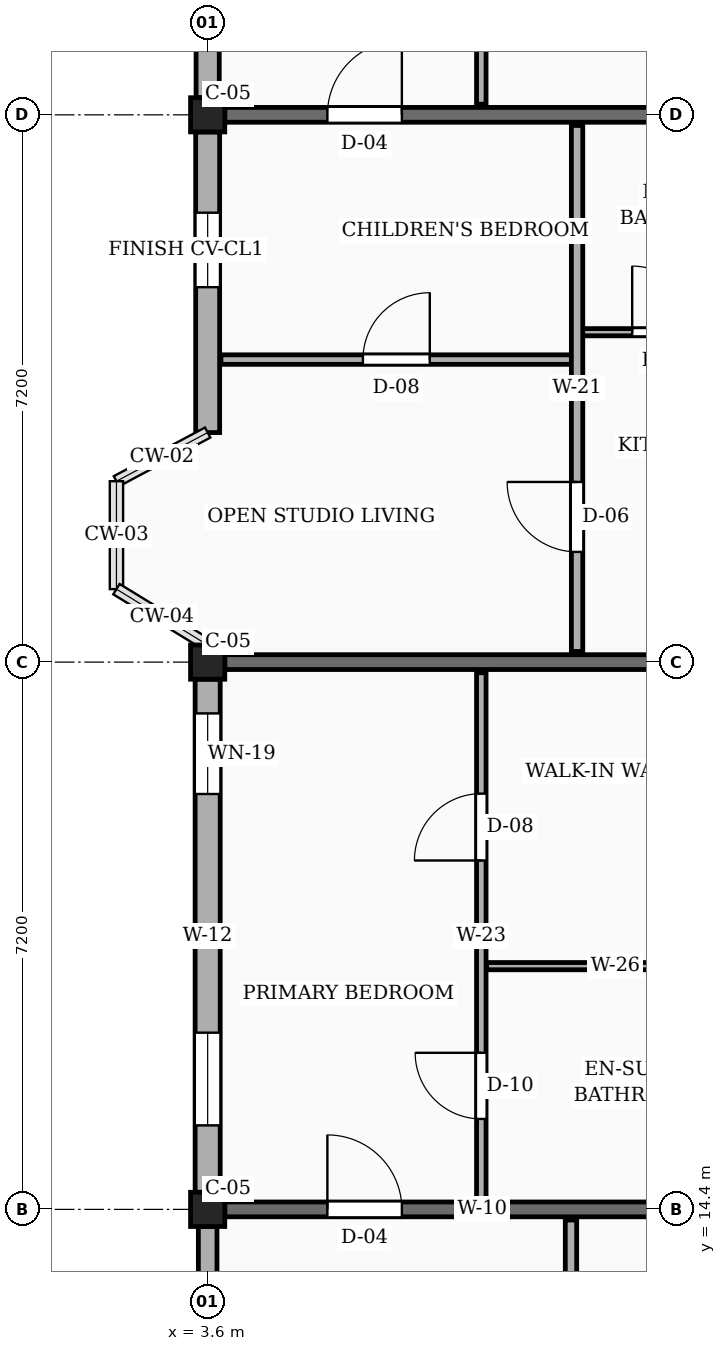
"""IFC4 building model, lengths in metres.
Left out: names, types, materials, properties, quantities, classifications, styles, units other than length and angle.
Written with IfcOpenShell. Run it as: python <this file> out.ifc"""

import sys

from ifc_helpers import new_model, si_unit, direction, frame, frame_2d, origin, origin_2d, place, context, subcontext, project, spatial, rectangle, extrude, element, fill, save


model = new_model("IFC4")
c1 = context("Model", 3, precision=1e-05, world=origin(), true_north=direction((0.0, 1.0)))
c2 = subcontext(c1, "Body", "Model", "MODEL_VIEW")
j1 = project(units=[si_unit("LENGTHUNIT", "METRE"), si_unit("PLANEANGLEUNIT", "RADIAN")], contexts=[c1])
p1 = place(None, origin())
s1 = spatial("IfcSite", under=j1, at=p1, CompositionType="ELEMENT")
p2 = place(p1, origin())
s2 = spatial("IfcBuilding", under=s1, at=p2, CompositionType="ELEMENT")
p3 = place(p2, frame((0.0, 0.0, 42.3)))
s3 = spatial("IfcBuildingStorey", under=s2, at=p3, CompositionType="ELEMENT", Elevation=42.3)
for number, where, z_axis, x_axis in (
    (1, (3.6, 14.4, 0.0), (0.0, 0.0, 1.0), (1.0, 0.0, 0.0)),
    (2, (3.6, 21.6, 0.0), (0.0, 0.0, 1.0), (1.0, 0.0, 0.0)),
    (3, (3.6, 28.8, 0.0), (0.0, 0.0, 1.0), (1.0, 0.0, 0.0)),
):
    element("IfcColumn", number, at=place(p3, frame(where, z_axis=z_axis, x_axis=x_axis)), inside=s3, PredefinedType="COLUMN", context=c2, shape_type="SweptSolid", body=[
        extrude(rectangle(XDim=0.45, YDim=0.45, at=origin_2d()), origin(), (0.0, 0.0, 1.0), 3.15),
    ])
p4 = place(p3, frame((3.825, 14.4, 0.0), z_axis=(0.0, 0.0, 1.0), x_axis=(1.0, 0.0, 0.0)))
e4 = element("IfcWall", 4, at=p4, inside=s3, PredefinedType="SOLIDWALL", context=c2, shape_type="SweptSolid", body=[
    extrude(rectangle(XDim=6.775, YDim=0.195, at=frame_2d((3.388, 0.0))), origin(), (0.0, 0.0, 1.0), 2.17),
])
p5 = place(p4, frame((1.35, 0.0, 0.0)))
e5 = element("IfcOpeningElement", 5, at=p5, cuts=e4, PredefinedType="OPENING", context=c2, shape_type="SweptSolid", body=[
    extrude(rectangle(XDim=0.98, YDim=2.12, at=frame_2d((0.49, 1.06))), frame((0.0, 0.107, 0.0), z_axis=(0.0, -1.0, 0.0), x_axis=(1.0, 0.0, 0.0)), (0.0, 0.0, 1.0), 0.215),
])
p6 = place(p3, frame((3.825, 21.6, 0.0), z_axis=(0.0, 0.0, 1.0), x_axis=(1.0, 0.0, 0.0)))
e6 = element("IfcWall", 6, at=p6, inside=s3, PredefinedType="SOLIDWALL", context=c2, shape_type="SweptSolid", body=[
    extrude(rectangle(XDim=6.775, YDim=0.195, at=frame_2d((3.388, 0.0))), origin(), (0.0, 0.0, 1.0), 2.17),
])
p7 = place(p3, frame((3.825, 28.8, 0.0), z_axis=(0.0, 0.0, 1.0), x_axis=(1.0, 0.0, 0.0)))
e7 = element("IfcWall", 7, at=p7, inside=s3, PredefinedType="SOLIDWALL", context=c2, shape_type="SweptSolid", body=[
    extrude(rectangle(XDim=6.775, YDim=0.195, at=frame_2d((3.388, 0.0))), origin(), (0.0, 0.0, 1.0), 2.17),
])
p8 = place(p7, frame((1.35, 0.0, 0.0)))
e8 = element("IfcOpeningElement", 8, at=p8, cuts=e7, PredefinedType="OPENING", context=c2, shape_type="SweptSolid", body=[
    extrude(rectangle(XDim=0.98, YDim=2.12, at=frame_2d((0.49, 1.06))), frame((0.0, 0.107, 0.0), z_axis=(0.0, -1.0, 0.0), x_axis=(1.0, 0.0, 0.0)), (0.0, 0.0, 1.0), 0.215),
])
p9 = place(p3, frame((3.6, 35.775, 0.0), z_axis=(0.0, 0.0, 1.0), x_axis=(0.0, -1.0, 0.0)))
e9 = element("IfcWall", 9, at=p9, inside=s3, PredefinedType="SOLIDWALL", context=c2, shape_type="SweptSolid", body=[
    extrude(rectangle(XDim=6.75, YDim=0.305, at=frame_2d((3.375, 0.0))), origin(), (0.0, 0.0, 1.0), 2.44),
])
p10 = place(p9, frame((0.45, 0.0, 0.78)))
e10 = element("IfcOpeningElement", 10, at=p10, cuts=e9, PredefinedType="OPENING", context=c2, shape_type="SweptSolid", body=[
    extrude(rectangle(XDim=1.44, YDim=1.26, at=frame_2d((0.72, 0.63))), frame((0.0, 0.163, 0.0), z_axis=(0.0, -1.0, 0.0), x_axis=(1.0, 0.0, 0.0)), (0.0, 0.0, 1.0), 0.325),
])
p11 = place(p9, frame((4.65, 0.0, 0.78)))
e11 = element("IfcOpeningElement", 11, at=p11, cuts=e9, PredefinedType="OPENING", context=c2, shape_type="SweptSolid", body=[
    extrude(rectangle(XDim=0.98, YDim=1.36, at=frame_2d((0.49, 0.68))), frame((0.0, 0.163, 0.0), z_axis=(0.0, -1.0, 0.0), x_axis=(1.0, 0.0, 0.0)), (0.0, 0.0, 1.0), 0.325),
])
p12 = place(p3, frame((3.6, 28.575, 0.0), z_axis=(0.0, 0.0, 1.0), x_axis=(0.0, -1.0, 0.0)))
e12 = element("IfcWall", 12, at=p12, inside=s3, PredefinedType="SOLIDWALL", context=c2, shape_type="SweptSolid", body=[
    extrude(rectangle(XDim=3.955, YDim=0.315, at=frame_2d((1.978, 0.0))), origin(), (0.0, 0.0, 1.0), 2.44),
])
p13 = place(p12, frame((1.062, 0.0, 0.78)))
e13 = element("IfcOpeningElement", 13, at=p13, cuts=e12, PredefinedType="OPENING", context=c2, shape_type="SweptSolid", body=[
    extrude(rectangle(XDim=0.98, YDim=1.36, at=frame_2d((0.49, 0.68))), frame((0.0, 0.167, 0.0), z_axis=(0.0, -1.0, 0.0), x_axis=(1.0, 0.0, 0.0)), (0.0, 0.0, 1.0), 0.335),
])
p14 = place(p3, frame((3.6, 21.375, 0.0), z_axis=(0.0, 0.0, 1.0), x_axis=(0.0, -1.0, 0.0)))
e14 = element("IfcWall", 14, at=p14, inside=s3, PredefinedType="SOLIDWALL", context=c2, shape_type="SweptSolid", body=[
    extrude(rectangle(XDim=6.75, YDim=0.33, at=frame_2d((3.375, 0.0))), origin(), (0.0, 0.0, 1.0), 2.44),
])
p15 = place(p14, frame((0.45, 0.0, 0.78)))
e15 = element("IfcOpeningElement", 15, at=p15, cuts=e14, PredefinedType="OPENING", context=c2, shape_type="SweptSolid", body=[
    extrude(rectangle(XDim=1.06, YDim=1.36, at=frame_2d((0.53, 0.68))), frame((0.0, 0.175, 0.0), z_axis=(0.0, -1.0, 0.0), x_axis=(1.0, 0.0, 0.0)), (0.0, 0.0, 1.0), 0.35),
])
p16 = place(p14, frame((4.65, 0.0, 0.78)))
e16 = element("IfcOpeningElement", 16, at=p16, cuts=e14, PredefinedType="OPENING", context=c2, shape_type="SweptSolid", body=[
    extrude(rectangle(XDim=1.22, YDim=1.36, at=frame_2d((0.61, 0.68))), frame((0.0, 0.175, 0.0), z_axis=(0.0, -1.0, 0.0), x_axis=(1.0, 0.0, 0.0)), (0.0, 0.0, 1.0), 0.35),
])
p17 = place(p3, frame((3.6, 14.175, 0.0), z_axis=(0.0, 0.0, 1.0), x_axis=(0.0, -1.0, 0.0)))
e17 = element("IfcWall", 17, at=p17, inside=s3, PredefinedType="SOLIDWALL", context=c2, shape_type="SweptSolid", body=[
    extrude(rectangle(XDim=3.955, YDim=0.245, at=frame_2d((1.978, 0.0))), origin(), (0.0, 0.0, 1.0), 2.44),
])
p18 = place(p17, frame((0.893, 0.0, 0.78)))
e18 = element("IfcOpeningElement", 18, at=p18, cuts=e17, PredefinedType="OPENING", context=c2, shape_type="SweptSolid", body=[
    extrude(rectangle(XDim=1.22, YDim=1.36, at=frame_2d((0.61, 0.68))), frame((0.0, 0.133, 0.0), z_axis=(0.0, -1.0, 0.0), x_axis=(1.0, 0.0, 0.0)), (0.0, 0.0, 1.0), 0.265),
])
p19 = place(p3, frame((8.38, 7.375, 0.0), z_axis=(0.0, 0.0, 1.0), x_axis=(0.0, 1.0, 0.0)))
e19 = element("IfcWall", 19, at=p19, inside=s3, PredefinedType="PARTITIONING", context=c2, shape_type="SweptSolid", body=[
    extrude(rectangle(XDim=6.885, YDim=0.15, at=frame_2d((3.442, 0.0))), origin(), (0.0, 0.0, 1.0), 2.305),
])
p20 = place(p19, frame((1.275, 0.0, 0.0)))
e20 = element("IfcOpeningElement", 20, at=p20, cuts=e19, PredefinedType="OPENING", context=c2, shape_type="SweptSolid", body=[
    extrude(rectangle(XDim=0.92, YDim=2.1, at=frame_2d((0.46, 1.05))), frame((0.0, 0.085, 0.0), z_axis=(0.0, -1.0, 0.0), x_axis=(1.0, 0.0, 0.0)), (0.0, 0.0, 1.0), 0.17),
])
p21 = place(p3, frame((7.2, 14.54, 0.0), z_axis=(0.0, 0.0, 1.0), x_axis=(0.0, 1.0, 0.0)))
e21 = element("IfcWall", 21, at=p21, inside=s3, PredefinedType="PARTITIONING", context=c2, shape_type="SweptSolid", body=[
    extrude(rectangle(XDim=6.92, YDim=0.125, at=frame_2d((3.46, 0.0))), origin(), (0.0, 0.0, 1.0), 2.305),
])
p22 = place(p21, frame((1.05, 0.0, 0.0)))
e22 = element("IfcOpeningElement", 22, at=p22, cuts=e21, PredefinedType="OPENING", context=c2, shape_type="SweptSolid", body=[
    extrude(rectangle(XDim=0.87, YDim=2.05, at=frame_2d((0.435, 1.025))), frame((0.0, 0.073, 0.0), z_axis=(0.0, -1.0, 0.0), x_axis=(1.0, 0.0, 0.0)), (0.0, 0.0, 1.0), 0.145),
])
p23 = place(p21, frame((4.45, 0.0, 0.0)))
e23 = element("IfcOpeningElement", 23, at=p23, cuts=e21, PredefinedType="OPENING", context=c2, shape_type="SweptSolid", body=[
    extrude(rectangle(XDim=0.88, YDim=2.08, at=frame_2d((0.44, 1.04))), frame((0.0, 0.073, 0.0), z_axis=(0.0, -1.0, 0.0), x_axis=(1.0, 0.0, 0.0)), (0.0, 0.0, 1.0), 0.145),
])
p24 = place(p3, frame((7.27, 17.6, 0.0), z_axis=(0.0, 0.0, 1.0), x_axis=(1.0, 0.0, 0.0)))
e24 = element("IfcWall", 24, at=p24, inside=s3, PredefinedType="PARTITIONING", context=c2, shape_type="SweptSolid", body=[
    extrude(rectangle(XDim=3.39, YDim=0.095, at=frame_2d((1.695, 0.0))), origin(), (0.0, 0.0, 1.0), 2.305),
])
p25 = place(p3, frame((3.775, 25.58, 0.0), z_axis=(0.0, 0.0, 1.0), x_axis=(1.0, 0.0, 0.0)))
e25 = element("IfcWall", 25, at=p25, inside=s3, PredefinedType="PARTITIONING", context=c2, shape_type="SweptSolid", body=[
    extrude(rectangle(XDim=4.615, YDim=0.125, at=frame_2d((2.308, 0.0))), origin(), (0.0, 0.0, 1.0), 2.305),
])
p26 = place(p25, frame((1.867, 0.0, 0.0)))
e26 = element("IfcOpeningElement", 26, at=p26, cuts=e25, PredefinedType="OPENING", context=c2, shape_type="SweptSolid", body=[
    extrude(rectangle(XDim=0.88, YDim=2.08, at=frame_2d((0.44, 1.04))), frame((0.0, 0.073, 0.0), z_axis=(0.0, -1.0, 0.0), x_axis=(1.0, 0.0, 0.0)), (0.0, 0.0, 1.0), 0.145),
])
p27 = place(p3, frame((8.53, 25.94, 0.0), z_axis=(0.0, 0.0, 1.0), x_axis=(1.0, 0.0, 0.0)))
e27 = element("IfcWall", 27, at=p27, inside=s3, PredefinedType="PARTITIONING", context=c2, shape_type="SweptSolid", body=[
    extrude(rectangle(XDim=2.18, YDim=0.095, at=frame_2d((1.09, 0.0))), origin(), (0.0, 0.0, 1.0), 2.305),
])
p28 = place(p27, frame((0.655, 0.0, 0.0)))
e28 = element("IfcOpeningElement", 28, at=p28, cuts=e27, PredefinedType="OPENING", context=c2, shape_type="SweptSolid", body=[
    extrude(rectangle(XDim=0.87, YDim=2.05, at=frame_2d((0.435, 1.025))), frame((0.0, 0.058, 0.0), z_axis=(0.0, -1.0, 0.0), x_axis=(1.0, 0.0, 0.0)), (0.0, 0.0, 1.0), 0.115),
])
p29 = place(p3, frame((8.46, 21.74, 0.0), z_axis=(0.0, 0.0, 1.0), x_axis=(0.0, 1.0, 0.0)))
e29 = element("IfcWall", 29, at=p29, inside=s3, PredefinedType="PARTITIONING", context=c2, shape_type="SweptSolid", body=[
    extrude(rectangle(XDim=6.92, YDim=0.15, at=frame_2d((3.46, 0.0))), origin(), (0.0, 0.0, 1.0), 2.305),
])
p30 = place(p29, frame((1.31, 0.0, 0.0)))
e30 = element("IfcOpeningElement", 30, at=p30, cuts=e29, PredefinedType="OPENING", context=c2, shape_type="SweptSolid", body=[
    extrude(rectangle(XDim=0.92, YDim=2.1, at=frame_2d((0.46, 1.05))), frame((0.0, 0.085, 0.0), z_axis=(0.0, -1.0, 0.0), x_axis=(1.0, 0.0, 0.0)), (0.0, 0.0, 1.0), 0.17),
])
p31 = place(p3, frame((7.2, 28.94, 0.0), z_axis=(0.0, 0.0, 1.0), x_axis=(0.0, 1.0, 0.0)))
e31 = element("IfcWall", 31, at=p31, inside=s3, PredefinedType="PARTITIONING", context=c2, shape_type="SweptSolid", body=[
    extrude(rectangle(XDim=6.92, YDim=0.125, at=frame_2d((3.46, 0.0))), origin(), (0.0, 0.0, 1.0), 2.305),
])
p32 = place(p31, frame((1.05, 0.0, 0.0)))
e32 = element("IfcOpeningElement", 32, at=p32, cuts=e31, PredefinedType="OPENING", context=c2, shape_type="SweptSolid", body=[
    extrude(rectangle(XDim=0.87, YDim=2.05, at=frame_2d((0.435, 1.025))), frame((0.0, 0.073, 0.0), z_axis=(0.0, -1.0, 0.0), x_axis=(1.0, 0.0, 0.0)), (0.0, 0.0, 1.0), 0.145),
])
p33 = place(p31, frame((4.45, 0.0, 0.0)))
e33 = element("IfcOpeningElement", 33, at=p33, cuts=e31, PredefinedType="OPENING", context=c2, shape_type="SweptSolid", body=[
    extrude(rectangle(XDim=0.88, YDim=2.08, at=frame_2d((0.44, 1.04))), frame((0.0, 0.073, 0.0), z_axis=(0.0, -1.0, 0.0), x_axis=(1.0, 0.0, 0.0)), (0.0, 0.0, 1.0), 0.145),
])
p34 = place(p13, origin())
e34 = element("IfcWindow", 34, at=p34, inside=s3, PartitioningType="SINGLE_PANEL", PredefinedType="WINDOW", context=c2, shape_type="SweptSolid", body=[
    extrude(rectangle(XDim=0.98, YDim=1.36, at=frame_2d((0.49, 0.68))), frame((0.0, 0.03, 0.0), z_axis=(0.0, -1.0, 0.0), x_axis=(1.0, 0.0, 0.0)), (0.0, 0.0, 1.0), 0.06),
])
fill(e13, e34)
p35 = place(p15, origin())
e35 = element("IfcWindow", 35, at=p35, inside=s3, PartitioningType="SINGLE_PANEL", PredefinedType="WINDOW", context=c2, shape_type="SweptSolid", body=[
    extrude(rectangle(XDim=1.06, YDim=1.36, at=frame_2d((0.53, 0.68))), frame((0.0, 0.03, 0.0), z_axis=(0.0, -1.0, 0.0), x_axis=(1.0, 0.0, 0.0)), (0.0, 0.0, 1.0), 0.06),
])
fill(e15, e35)
p36 = place(p16, origin())
e36 = element("IfcWindow", 36, at=p36, inside=s3, PartitioningType="SINGLE_PANEL", PredefinedType="WINDOW", context=c2, shape_type="SweptSolid", body=[
    extrude(rectangle(XDim=1.22, YDim=1.36, at=frame_2d((0.61, 0.68))), frame((0.0, 0.03, 0.0), z_axis=(0.0, -1.0, 0.0), x_axis=(1.0, 0.0, 0.0)), (0.0, 0.0, 1.0), 0.06),
])
fill(e16, e36)
p37 = place(p22, origin())
e37 = element("IfcDoor", 37, at=p37, inside=s3, OperationType="SINGLE_SWING_RIGHT", PredefinedType="DOOR", context=c2, shape_type="SweptSolid", body=[
    extrude(rectangle(XDim=0.87, YDim=2.05, at=frame_2d((0.435, 1.025))), frame((0.0, 0.025, 0.0), z_axis=(0.0, -1.0, 0.0), x_axis=(1.0, 0.0, 0.0)), (0.0, 0.0, 1.0), 0.05),
])
fill(e22, e37)
p38 = place(p23, origin())
e38 = element("IfcDoor", 38, at=p38, inside=s3, OperationType="SINGLE_SWING_LEFT", PredefinedType="DOOR", context=c2, shape_type="SweptSolid", body=[
    extrude(rectangle(XDim=0.88, YDim=2.08, at=frame_2d((0.44, 1.04))), frame((0.0, 0.025, 0.0), z_axis=(0.0, -1.0, 0.0), x_axis=(1.0, 0.0, 0.0)), (0.0, 0.0, 1.0), 0.05),
])
fill(e23, e38)
p39 = place(p26, origin())
e39 = element("IfcDoor", 39, at=p39, inside=s3, OperationType="SINGLE_SWING_RIGHT", PredefinedType="DOOR", context=c2, shape_type="SweptSolid", body=[
    extrude(rectangle(XDim=0.88, YDim=2.08, at=frame_2d((0.44, 1.04))), frame((0.0, 0.025, 0.0), z_axis=(0.0, -1.0, 0.0), x_axis=(1.0, 0.0, 0.0)), (0.0, 0.0, 1.0), 0.05),
])
fill(e26, e39)
p40 = place(p28, origin())
e40 = element("IfcDoor", 40, at=p40, inside=s3, OperationType="SINGLE_SWING_LEFT", PredefinedType="DOOR", context=c2, shape_type="SweptSolid", body=[
    extrude(rectangle(XDim=0.87, YDim=2.05, at=frame_2d((0.435, 1.025))), frame((0.0, 0.025, 0.0), z_axis=(0.0, -1.0, 0.0), x_axis=(1.0, 0.0, 0.0)), (0.0, 0.0, 1.0), 0.05),
])
fill(e28, e40)
p41 = place(p30, origin())
e41 = element("IfcDoor", 41, at=p41, inside=s3, OperationType="SINGLE_SWING_RIGHT", PredefinedType="DOOR", context=c2, shape_type="SweptSolid", body=[
    extrude(rectangle(XDim=0.92, YDim=2.1, at=frame_2d((0.46, 1.05))), frame((0.0, 0.025, 0.0), z_axis=(0.0, -1.0, 0.0), x_axis=(1.0, 0.0, 0.0)), (0.0, 0.0, 1.0), 0.05),
])
fill(e30, e41)
p42 = place(p5, origin())
e42 = element("IfcDoor", 42, at=p42, inside=s3, OperationType="SINGLE_SWING_LEFT", PredefinedType="DOOR", context=c2, shape_type="SweptSolid", body=[
    extrude(rectangle(XDim=0.98, YDim=2.12, at=frame_2d((0.49, 1.06))), frame((0.0, 0.025, 0.0), z_axis=(0.0, -1.0, 0.0), x_axis=(1.0, 0.0, 0.0)), (0.0, 0.0, 1.0), 0.05),
])
fill(e5, e42)
p43 = place(p8, origin())
e43 = element("IfcDoor", 43, at=p43, inside=s3, OperationType="SINGLE_SWING_RIGHT", PredefinedType="DOOR", context=c2, shape_type="SweptSolid", body=[
    extrude(rectangle(XDim=0.98, YDim=2.12, at=frame_2d((0.49, 1.06))), frame((0.0, 0.025, 0.0), z_axis=(0.0, -1.0, 0.0), x_axis=(1.0, 0.0, 0.0)), (0.0, 0.0, 1.0), 0.05),
])
fill(e8, e43)
save(model, sys.argv[1])
